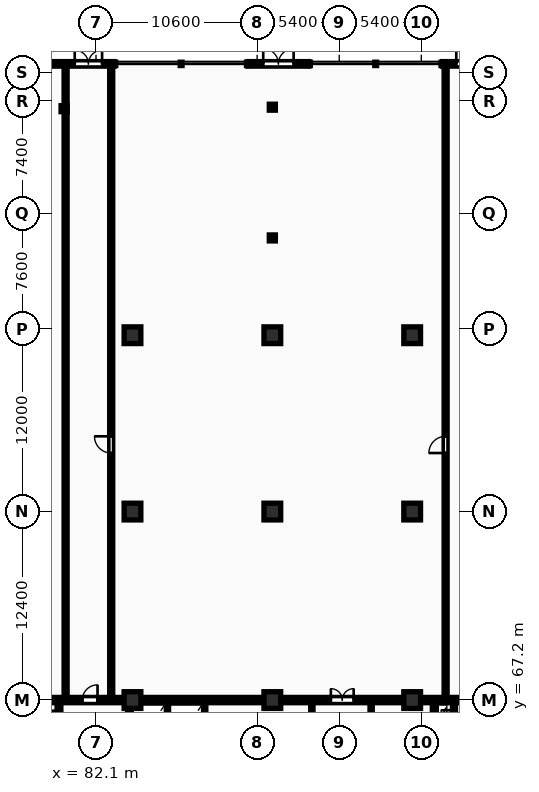
"""IFC4 building model, lengths in metres.
Left out: names, types, materials, properties, quantities, classifications, styles, units other than length and angle.
Written with IfcOpenShell. Run it as: python <this file> out.ifc"""

import sys

from ifc_helpers import new_model, si_unit, direction, frame, frame_2d, origin, origin_2d, place, context, subcontext, project, spatial, rectangle, i_section, extrude, element, fill, save


model = new_model("IFC4")
c1 = context("Model", 3, precision=1e-05, world=origin(), true_north=direction((0.0, 1.0)))
c2 = subcontext(c1, "Body", "Model", "MODEL_VIEW")
j1 = project(units=[si_unit("LENGTHUNIT", "METRE"), si_unit("PLANEANGLEUNIT", "RADIAN")], contexts=[c1])
p1 = place(None, origin())
s1 = spatial("IfcSite", under=j1, at=p1, CompositionType="ELEMENT")
p2 = place(p1, origin())
s2 = spatial("IfcBuilding", under=s1, at=p2, CompositionType="ELEMENT")
p3 = place(p2, origin())
s3 = spatial("IfcBuildingStorey", under=s2, at=p3, CompositionType="ELEMENT", Elevation=0.0)
for number, where, z_axis, x_axis in (
    (1, (84.5, 67.2, 0.0), (0.0, 0.0, 1.0), (1.0, 0.0, 0.0)),
    (2, (84.5, 79.6, 0.0), (0.0, 0.0, 1.0), (1.0, 0.0, 0.0)),
    (3, (84.5, 91.2, 0.0), (0.0, 0.0, 1.0), (1.0, 0.0, 0.0)),
    (4, (93.7, 67.2, 0.0), (0.0, 0.0, 1.0), (1.0, 0.0, 0.0)),
    (5, (93.7, 79.6, 0.0), (0.0, 0.0, 1.0), (1.0, 0.0, 0.0)),
    (6, (93.7, 91.2, 0.0), (0.0, 0.0, 1.0), (1.0, 0.0, 0.0)),
    (7, (102.9, 67.2, 0.0), (0.0, 0.0, 1.0), (1.0, 0.0, 0.0)),
    (8, (102.9, 79.6, 0.0), (0.0, 0.0, 1.0), (1.0, 0.0, 0.0)),
    (9, (102.9, 91.2, 0.0), (0.0, 0.0, 1.0), (1.0, 0.0, 0.0)),
):
    element("IfcColumn", number, at=place(p3, frame(where, z_axis=z_axis, x_axis=x_axis)), inside=s3, PredefinedType="COLUMN", context=c2, shape_type="SweptSolid", body=[
        extrude(rectangle(XDim=1.1, YDim=1.1, at=origin_2d()), origin(), (0.0, 0.0, 1.0), 5.4),
    ])
for number, where, z_axis, x_axis in (
    (10, (93.7, 97.6, 0.0), (0.0, 0.0, 1.0), (1.0, 0.0, 0.0)),
    (11, (80.0, 106.1, 0.0), (0.0, 0.0, 1.0), (1.0, 0.0, 0.0)),
    (12, (93.7, 106.2, 0.0), (0.0, 0.0, 1.0), (1.0, 0.0, 0.0)),
):
    element("IfcColumn", number, at=place(p3, frame(where, z_axis=z_axis, x_axis=x_axis)), inside=s3, PredefinedType="COLUMN", context=c2, shape_type="SweptSolid", body=[
        extrude(i_section(OverallWidth=0.399, OverallDepth=0.394, WebThickness=0.023, FlangeThickness=0.037, FilletRadius=0.015, at=origin_2d()), origin(), (0.0, 0.0, 1.0), 5.4),
    ])
p4 = place(p3, frame((153.5, 109.05, 0.0), z_axis=(0.0, 0.0, 1.0), x_axis=(-1.0, 0.0, 0.0)))
e13 = element("IfcWall", 13, at=p4, inside=s3, PredefinedType="STANDARD", context=c2, shape_type="SweptSolid", body=[
    extrude(rectangle(XDim=48.6, YDim=0.3, at=frame_2d((24.3, 0.0))), origin(), (0.0, 0.0, 1.0), 5.1),
])
p5 = place(p4, frame((45.9, 0.0, 0.0)))
e14 = element("IfcOpeningElement", 14, at=p5, cuts=e13, PredefinedType="OPENING", context=c2, shape_type="SweptSolid", body=[
    extrude(rectangle(XDim=1.8, YDim=2.2, at=frame_2d((0.9, 1.1))), frame((0.0, 0.16, 0.0), z_axis=(0.0, -1.0, 0.0), x_axis=(1.0, 0.0, 0.0)), (0.0, 0.0, 1.0), 0.32),
])
p6 = place(p4, frame((12.0, 0.0, 0.9)))
e15 = element("IfcOpeningElement", 15, at=p6, cuts=e13, PredefinedType="OPENING", context=c2, shape_type="SweptSolid", body=[
    extrude(rectangle(XDim=3.0, YDim=2.6, at=frame_2d((1.5, 1.3))), frame((0.0, 0.16, 0.0), z_axis=(0.0, -1.0, 0.0), x_axis=(1.0, 0.0, 0.0)), (0.0, 0.0, 1.0), 0.32),
])
p7 = place(p3, frame((96.1, 109.05, 0.0), z_axis=(0.0, 0.0, 1.0), x_axis=(-1.0, 0.0, 0.0)))
e16 = element("IfcWall", 16, at=p7, inside=s3, PredefinedType="STANDARD", context=c2, shape_type="SweptSolid", body=[
    extrude(rectangle(XDim=4.0, YDim=0.3, at=frame_2d((2.0, 0.0))), origin(), (0.0, 0.0, 1.0), 5.1),
])
p8 = place(p7, frame((1.0, 0.0, 0.0)))
e17 = element("IfcOpeningElement", 17, at=p8, cuts=e16, PredefinedType="OPENING", context=c2, shape_type="SweptSolid", body=[
    extrude(rectangle(XDim=2.0, YDim=2.6, at=frame_2d((1.0, 1.3))), frame((0.0, 0.16, 0.0), z_axis=(0.0, -1.0, 0.0), x_axis=(1.0, 0.0, 0.0)), (0.0, 0.0, 1.0), 0.32),
])
p9 = place(p3, frame((83.3, 109.05, 0.0), z_axis=(0.0, 0.0, 1.0), x_axis=(-1.0, 0.0, 0.0)))
e18 = element("IfcWall", 18, at=p9, inside=s3, PredefinedType="STANDARD", context=c2, shape_type="SweptSolid", body=[
    extrude(rectangle(XDim=39.8, YDim=0.3, at=frame_2d((19.9, 0.0))), origin(), (0.0, 0.0, 1.0), 5.1),
])
p10 = place(p9, frame((0.8, 0.0, 0.0)))
e19 = element("IfcOpeningElement", 19, at=p10, cuts=e18, PredefinedType="OPENING", context=c2, shape_type="SweptSolid", body=[
    extrude(rectangle(XDim=1.8, YDim=2.2, at=frame_2d((0.9, 1.1))), frame((0.0, 0.16, 0.0), z_axis=(0.0, -1.0, 0.0), x_axis=(1.0, 0.0, 0.0)), (0.0, 0.0, 1.0), 0.32),
])
p11 = place(p9, frame((6.2, 0.0, 0.0)))
e20 = element("IfcOpeningElement", 20, at=p11, cuts=e18, PredefinedType="OPENING", context=c2, shape_type="SweptSolid", body=[
    extrude(rectangle(XDim=1.8, YDim=2.2, at=frame_2d((0.9, 1.1))), frame((0.0, 0.16, 0.0), z_axis=(0.0, -1.0, 0.0), x_axis=(1.0, 0.0, 0.0)), (0.0, 0.0, 1.0), 0.32),
])
p12 = place(p9, frame((20.0, 0.0, 0.0)))
e21 = element("IfcOpeningElement", 21, at=p12, cuts=e18, PredefinedType="OPENING", context=c2, shape_type="SweptSolid", body=[
    extrude(rectangle(XDim=2.0, YDim=2.6, at=frame_2d((1.0, 1.3))), frame((0.0, 0.16, 0.0), z_axis=(0.0, -1.0, 0.0), x_axis=(1.0, 0.0, 0.0)), (0.0, 0.0, 1.0), 0.32),
])
p13 = place(p3, frame((75.95, 67.2, 0.0), z_axis=(0.0, 0.0, 1.0), x_axis=(1.0, 0.0, 0.0)))
e22 = element("IfcWall", 22, at=p13, inside=s3, PredefinedType="SHEAR", context=c2, shape_type="SweptSolid", body=[
    extrude(rectangle(XDim=36.3, YDim=0.35, at=frame_2d((18.15, 0.0))), origin(), (0.0, 0.0, 1.0), 5.4),
])
p14 = place(p13, frame((5.25, 0.0, 0.0)))
e23 = element("IfcOpeningElement", 23, at=p14, cuts=e22, PredefinedType="OPENING", context=c2, shape_type="SweptSolid", body=[
    extrude(rectangle(XDim=1.0, YDim=2.15, at=frame_2d((0.5, 1.075))), frame((0.0, 0.185, 0.0), z_axis=(0.0, -1.0, 0.0), x_axis=(1.0, 0.0, 0.0)), (0.0, 0.0, 1.0), 0.37),
])
p15 = place(p13, frame((21.6, 0.0, 0.0)))
e24 = element("IfcOpeningElement", 24, at=p15, cuts=e22, PredefinedType="OPENING", context=c2, shape_type="SweptSolid", body=[
    extrude(rectangle(XDim=1.5, YDim=2.2, at=frame_2d((0.75, 1.1))), frame((0.0, 0.185, 0.0), z_axis=(0.0, -1.0, 0.0), x_axis=(1.0, 0.0, 0.0)), (0.0, 0.0, 1.0), 0.37),
])
p16 = place(p13, frame((30.45, 0.0, 0.0)))
e25 = element("IfcOpeningElement", 25, at=p16, cuts=e22, PredefinedType="OPENING", context=c2, shape_type="SweptSolid", body=[
    extrude(rectangle(XDim=1.0, YDim=2.15, at=frame_2d((0.5, 1.075))), frame((0.0, 0.185, 0.0), z_axis=(0.0, -1.0, 0.0), x_axis=(1.0, 0.0, 0.0)), (0.0, 0.0, 1.0), 0.37),
])
p17 = place(p3, frame((79.665, 55.4, 0.0), z_axis=(0.0, 0.0, 1.0), x_axis=(0.0, 1.0, 0.0)))
e26 = element("IfcWall", 26, at=p17, inside=s3, PredefinedType="SHEAR", context=c2, shape_type="SweptSolid", body=[
    extrude(rectangle(XDim=11.6, YDim=0.25, at=frame_2d((5.8, 0.0))), origin(), (0.0, 0.0, 1.0), 5.4),
])
p18 = place(p17, frame((0.55, 0.0, 0.0)))
e27 = element("IfcOpeningElement", 27, at=p18, cuts=e26, PredefinedType="OPENING", context=c2, shape_type="SweptSolid", body=[
    extrude(rectangle(XDim=0.85, YDim=2.05, at=frame_2d((0.425, 1.025))), frame((0.0, 0.135, 0.0), z_axis=(0.0, -1.0, 0.0), x_axis=(1.0, 0.0, 0.0)), (0.0, 0.0, 1.0), 0.27),
])
p19 = place(p17, frame((8.4, 0.0, 0.0)))
e28 = element("IfcOpeningElement", 28, at=p19, cuts=e26, PredefinedType="OPENING", context=c2, shape_type="SweptSolid", body=[
    extrude(rectangle(XDim=1.1, YDim=2.1, at=frame_2d((0.55, 1.05))), frame((0.0, 0.135, 0.0), z_axis=(0.0, -1.0, 0.0), x_axis=(1.0, 0.0, 0.0)), (0.0, 0.0, 1.0), 0.27),
])
p20 = place(p17, frame((10.25, 0.0, 0.0)))
e29 = element("IfcOpeningElement", 29, at=p20, cuts=e26, PredefinedType="OPENING", context=c2, shape_type="SweptSolid", body=[
    extrude(rectangle(XDim=0.85, YDim=2.05, at=frame_2d((0.425, 1.025))), frame((0.0, 0.135, 0.0), z_axis=(0.0, -1.0, 0.0), x_axis=(1.0, 0.0, 0.0)), (0.0, 0.0, 1.0), 0.27),
])
p21 = place(p3, frame((84.3, 55.4, 0.0), z_axis=(0.0, 0.0, 1.0), x_axis=(0.0, 1.0, 0.0)))
e30 = element("IfcWall", 30, at=p21, inside=s3, PredefinedType="SHEAR", context=c2, shape_type="SweptSolid", body=[
    extrude(rectangle(XDim=11.6, YDim=0.25, at=frame_2d((5.8, 0.0))), origin(), (0.0, 0.0, 1.0), 5.4),
])
p22 = place(p21, frame((5.2, 0.0, 0.0)))
e31 = element("IfcOpeningElement", 31, at=p22, cuts=e30, PredefinedType="OPENING", context=c2, shape_type="SweptSolid", body=[
    extrude(rectangle(XDim=1.1, YDim=2.1, at=frame_2d((0.55, 1.05))), frame((0.0, 0.135, 0.0), z_axis=(0.0, -1.0, 0.0), x_axis=(1.0, 0.0, 0.0)), (0.0, 0.0, 1.0), 0.27),
])
for number, where, z_axis, x_axis in (
    (32, (86.8, 63.4, 0.0), (0.0, 0.0, 1.0), (0.0, 1.0, 0.0)),
    (33, (89.25, 63.4, 0.0), (0.0, 0.0, 1.0), (0.0, 1.0, 0.0)),
    (34, (96.3, 63.4, 0.0), (0.0, 0.0, 1.0), (0.0, 1.0, 0.0)),
    (35, (100.2, 63.4, 0.0), (0.0, 0.0, 1.0), (0.0, 1.0, 0.0)),
):
    element("IfcWall", number, at=place(p3, frame(where, z_axis=z_axis, x_axis=x_axis)), inside=s3, PredefinedType="PARTITIONING", context=c2, shape_type="SweptSolid", body=[
        extrude(rectangle(XDim=3.6, YDim=0.15, at=frame_2d((1.8, 0.0))), origin(), (0.0, 0.0, 1.0), 5.1),
    ])
p23 = place(p3, frame((105.65, 65.28, 0.0), z_axis=(0.0, 0.0, 1.0), x_axis=(0.0, 1.0, 0.0)))
e36 = element("IfcWall", 36, at=p23, inside=s3, PredefinedType="PARTITIONING", context=c2, shape_type="SweptSolid", body=[
    extrude(rectangle(XDim=1.72, YDim=0.2, at=frame_2d((0.86, 0.0))), origin(), (0.0, 0.0, 1.0), 5.1),
])
p24 = place(p23, frame((0.4, 0.0, 0.0)))
e37 = element("IfcOpeningElement", 37, at=p24, cuts=e36, PredefinedType="OPENING", context=c2, shape_type="SweptSolid", body=[
    extrude(rectangle(XDim=0.85, YDim=2.05, at=frame_2d((0.425, 1.025))), frame((0.0, 0.11, 0.0), z_axis=(0.0, -1.0, 0.0), x_axis=(1.0, 0.0, 0.0)), (0.0, 0.0, 1.0), 0.22),
])
p25 = place(p3, frame((104.35, 58.4, 0.0), z_axis=(0.0, 0.0, 1.0), x_axis=(0.0, 1.0, 0.0)))
e38 = element("IfcWall", 38, at=p25, inside=s3, PredefinedType="SHEAR", context=c2, shape_type="SweptSolid", body=[
    extrude(rectangle(XDim=8.6, YDim=0.25, at=frame_2d((4.3, 0.0))), origin(), (0.0, 0.0, 1.0), 5.4),
])
p26 = place(p25, frame((1.8, 0.0, 0.0)))
e39 = element("IfcOpeningElement", 39, at=p26, cuts=e38, PredefinedType="OPENING", context=c2, shape_type="SweptSolid", body=[
    extrude(rectangle(XDim=1.1, YDim=2.1, at=frame_2d((0.55, 1.05))), frame((0.0, 0.135, 0.0), z_axis=(0.0, -1.0, 0.0), x_axis=(1.0, 0.0, 0.0)), (0.0, 0.0, 1.0), 0.27),
])
p27 = place(p3, frame((80.1, 67.45, 0.0), z_axis=(0.0, 0.0, 1.0), x_axis=(0.0, 1.0, 0.0)))
e40 = element("IfcWall", 40, at=p27, inside=s3, PredefinedType="PARTITIONING", context=c2, shape_type="SweptSolid", body=[
    extrude(rectangle(XDim=41.45, YDim=0.2, at=frame_2d((20.725, 0.0))), origin(), (0.0, 0.0, 1.0), 5.1),
])
p28 = place(p3, frame((83.1, 67.45, 0.0), z_axis=(0.0, 0.0, 1.0), x_axis=(0.0, 1.0, 0.0)))
e41 = element("IfcWall", 41, at=p28, inside=s3, PredefinedType="PARTITIONING", context=c2, shape_type="SweptSolid", body=[
    extrude(rectangle(XDim=41.45, YDim=0.2, at=frame_2d((20.725, 0.0))), origin(), (0.0, 0.0, 1.0), 5.1),
])
p29 = place(p28, frame((16.0, 0.0, 0.0)))
e42 = element("IfcOpeningElement", 42, at=p29, cuts=e41, PredefinedType="OPENING", context=c2, shape_type="SweptSolid", body=[
    extrude(rectangle(XDim=1.1, YDim=2.1, at=frame_2d((0.55, 1.05))), frame((0.0, 0.11, 0.0), z_axis=(0.0, -1.0, 0.0), x_axis=(1.0, 0.0, 0.0)), (0.0, 0.0, 1.0), 0.22),
])
p30 = place(p3, frame((105.1, 67.45, 0.0), z_axis=(0.0, 0.0, 1.0), x_axis=(0.0, 1.0, 0.0)))
e43 = element("IfcWall", 43, at=p30, inside=s3, PredefinedType="PARTITIONING", context=c2, shape_type="SweptSolid", body=[
    extrude(rectangle(XDim=41.45, YDim=0.2, at=frame_2d((20.725, 0.0))), origin(), (0.0, 0.0, 1.0), 5.1),
])
p31 = place(p30, frame((16.0, 0.0, 0.0)))
e44 = element("IfcOpeningElement", 44, at=p31, cuts=e43, PredefinedType="OPENING", context=c2, shape_type="SweptSolid", body=[
    extrude(rectangle(XDim=1.1, YDim=2.1, at=frame_2d((0.55, 1.05))), frame((0.0, 0.11, 0.0), z_axis=(0.0, -1.0, 0.0), x_axis=(1.0, 0.0, 0.0)), (0.0, 0.0, 1.0), 0.22),
])
p32 = place(p5, frame((1.8, 0.0, 0.0), z_axis=(0.0, 0.0, 1.0), x_axis=(-1.0, 0.0, 0.0)))
e45 = element("IfcDoor", 45, at=p32, inside=s3, OperationType="DOUBLE_DOOR_SINGLE_SWING", PredefinedType="DOOR", context=c2, shape_type="SweptSolid", body=[
    extrude(rectangle(XDim=1.8, YDim=2.2, at=frame_2d((0.9, 1.1))), frame((0.0, 0.025, 0.0), z_axis=(0.0, -1.0, 0.0), x_axis=(1.0, 0.0, 0.0)), (0.0, 0.0, 1.0), 0.05),
])
fill(e14, e45)
p33 = place(p8, frame((2.0, 0.0, 0.0), z_axis=(0.0, 0.0, 1.0), x_axis=(-1.0, 0.0, 0.0)))
e46 = element("IfcDoor", 46, at=p33, inside=s3, OperationType="DOUBLE_DOOR_SINGLE_SWING", PredefinedType="DOOR", context=c2, shape_type="SweptSolid", body=[
    extrude(rectangle(XDim=2.0, YDim=2.6, at=frame_2d((1.0, 1.3))), frame((0.0, 0.025, 0.0), z_axis=(0.0, -1.0, 0.0), x_axis=(1.0, 0.0, 0.0)), (0.0, 0.0, 1.0), 0.05),
])
fill(e17, e46)
p34 = place(p10, frame((1.8, 0.0, 0.0), z_axis=(0.0, 0.0, 1.0), x_axis=(-1.0, 0.0, 0.0)))
e47 = element("IfcDoor", 47, at=p34, inside=s3, OperationType="DOUBLE_DOOR_SINGLE_SWING", PredefinedType="DOOR", context=c2, shape_type="SweptSolid", body=[
    extrude(rectangle(XDim=1.8, YDim=2.2, at=frame_2d((0.9, 1.1))), frame((0.0, 0.025, 0.0), z_axis=(0.0, -1.0, 0.0), x_axis=(1.0, 0.0, 0.0)), (0.0, 0.0, 1.0), 0.05),
])
fill(e19, e47)
p35 = place(p14, origin())
e48 = element("IfcDoor", 48, at=p35, inside=s3, OperationType="SINGLE_SWING_RIGHT", PredefinedType="DOOR", context=c2, shape_type="SweptSolid", body=[
    extrude(rectangle(XDim=1.0, YDim=2.15, at=frame_2d((0.5, 1.075))), frame((0.0, 0.025, 0.0), z_axis=(0.0, -1.0, 0.0), x_axis=(1.0, 0.0, 0.0)), (0.0, 0.0, 1.0), 0.05),
])
fill(e23, e48)
p36 = place(p15, origin())
e49 = element("IfcDoor", 49, at=p36, inside=s3, OperationType="DOUBLE_DOOR_SINGLE_SWING", PredefinedType="DOOR", context=c2, shape_type="SweptSolid", body=[
    extrude(rectangle(XDim=1.5, YDim=2.2, at=frame_2d((0.75, 1.1))), frame((0.0, 0.025, 0.0), z_axis=(0.0, -1.0, 0.0), x_axis=(1.0, 0.0, 0.0)), (0.0, 0.0, 1.0), 0.05),
])
fill(e24, e49)
p37 = place(p20, origin())
e50 = element("IfcDoor", 50, at=p37, inside=s3, OperationType="SINGLE_SWING_RIGHT", PredefinedType="DOOR", context=c2, shape_type="SweptSolid", body=[
    extrude(rectangle(XDim=0.85, YDim=2.05, at=frame_2d((0.425, 1.025))), frame((0.0, 0.025, 0.0), z_axis=(0.0, -1.0, 0.0), x_axis=(1.0, 0.0, 0.0)), (0.0, 0.0, 1.0), 0.05),
])
fill(e29, e50)
p38 = place(p24, origin())
e51 = element("IfcDoor", 51, at=p38, inside=s3, OperationType="SINGLE_SWING_RIGHT", PredefinedType="DOOR", context=c2, shape_type="SweptSolid", body=[
    extrude(rectangle(XDim=0.85, YDim=2.05, at=frame_2d((0.425, 1.025))), frame((0.0, 0.025, 0.0), z_axis=(0.0, -1.0, 0.0), x_axis=(1.0, 0.0, 0.0)), (0.0, 0.0, 1.0), 0.05),
])
fill(e37, e51)
p39 = place(p29, origin())
e52 = element("IfcDoor", 52, at=p39, inside=s3, OperationType="SINGLE_SWING_RIGHT", PredefinedType="DOOR", context=c2, shape_type="SweptSolid", body=[
    extrude(rectangle(XDim=1.1, YDim=2.1, at=frame_2d((0.55, 1.05))), frame((0.0, 0.025, 0.0), z_axis=(0.0, -1.0, 0.0), x_axis=(1.0, 0.0, 0.0)), (0.0, 0.0, 1.0), 0.05),
])
fill(e42, e52)
p40 = place(p31, origin())
e53 = element("IfcDoor", 53, at=p40, inside=s3, OperationType="SINGLE_SWING_LEFT", PredefinedType="DOOR", context=c2, shape_type="SweptSolid", body=[
    extrude(rectangle(XDim=1.1, YDim=2.1, at=frame_2d((0.55, 1.05))), frame((0.0, 0.025, 0.0), z_axis=(0.0, -1.0, 0.0), x_axis=(1.0, 0.0, 0.0)), (0.0, 0.0, 1.0), 0.05),
])
fill(e44, e53)
save(model, sys.argv[1])
